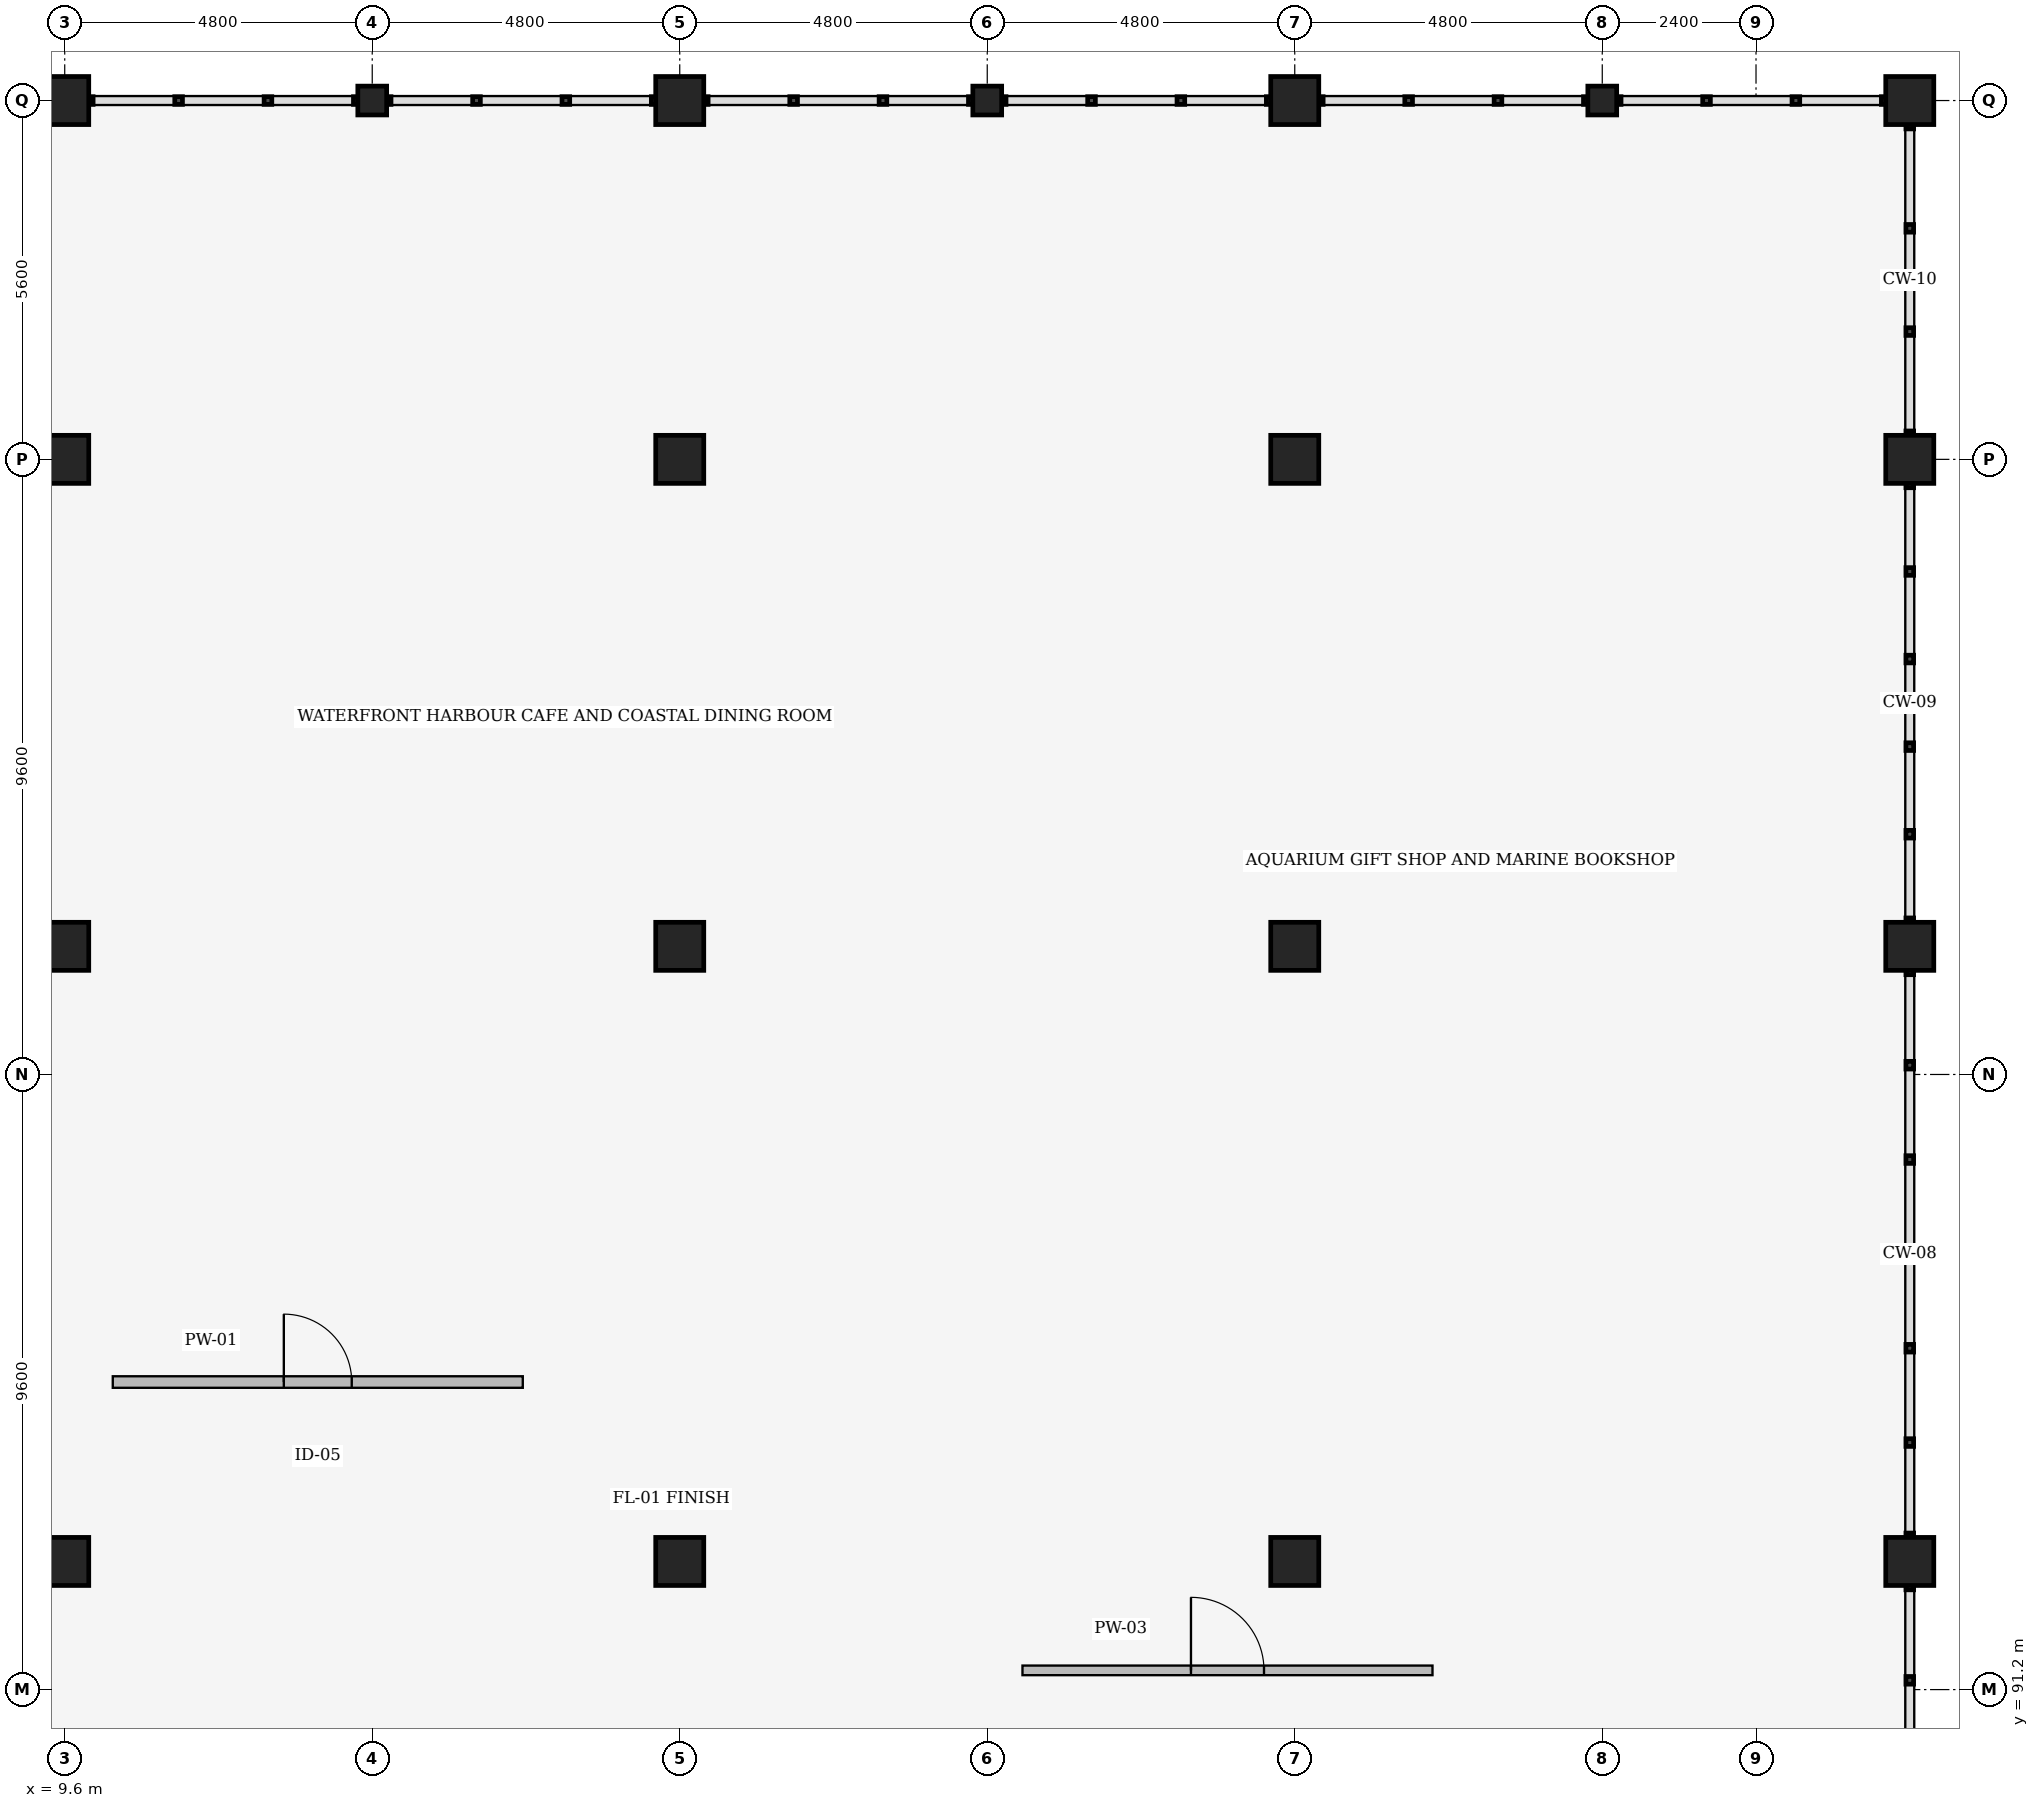
"""IFC4 building model, lengths in metres.
Left out: names, types, materials, properties, quantities, classifications, styles, units other than length and angle.
Written with IfcOpenShell. Run it as: python <this file> out.ifc"""

import sys

from ifc_helpers import new_model, si_unit, direction, frame, frame_2d, origin, origin_2d, place, context, subcontext, project, spatial, rectangle, extrude, element, fill, save


model = new_model("IFC4")
c1 = context("Model", 3, precision=1e-05, world=origin(), true_north=direction((0.0, 1.0)))
c2 = subcontext(c1, "Body", "Model", "MODEL_VIEW")
j1 = project(units=[si_unit("LENGTHUNIT", "METRE"), si_unit("PLANEANGLEUNIT", "RADIAN")], contexts=[c1])
p1 = place(None, origin())
s1 = spatial("IfcSite", under=j1, at=p1, CompositionType="ELEMENT")
p2 = place(p1, origin())
s2 = spatial("IfcBuilding", under=s1, at=p2, CompositionType="ELEMENT")
p3 = place(p2, origin())
s3 = spatial("IfcBuildingStorey", under=s2, at=p3, CompositionType="ELEMENT", Elevation=0.0)
for number, where, z_axis, x_axis in (
    (1, (9.6, 93.2, 0.0), (0.0, 0.0, 1.0), (1.0, 0.0, 0.0)),
    (2, (9.6, 102.8, 0.0), (0.0, 0.0, 1.0), (1.0, 0.0, 0.0)),
    (3, (9.6, 110.4, 0.0), (0.0, 0.0, 1.0), (1.0, 0.0, 0.0)),
    (4, (9.6, 116.0, 0.0), (0.0, 0.0, 1.0), (1.0, 0.0, 0.0)),
    (5, (19.2, 93.2, 0.0), (0.0, 0.0, 1.0), (1.0, 0.0, 0.0)),
    (6, (19.2, 102.8, 0.0), (0.0, 0.0, 1.0), (1.0, 0.0, 0.0)),
    (7, (19.2, 110.4, 0.0), (0.0, 0.0, 1.0), (1.0, 0.0, 0.0)),
    (8, (19.2, 116.0, 0.0), (0.0, 0.0, 1.0), (1.0, 0.0, 0.0)),
    (9, (28.8, 93.2, 0.0), (0.0, 0.0, 1.0), (1.0, 0.0, 0.0)),
    (10, (28.8, 102.8, 0.0), (0.0, 0.0, 1.0), (1.0, 0.0, 0.0)),
    (11, (28.8, 110.4, 0.0), (0.0, 0.0, 1.0), (1.0, 0.0, 0.0)),
    (12, (28.8, 116.0, 0.0), (0.0, 0.0, 1.0), (1.0, 0.0, 0.0)),
    (13, (38.4, 93.2, 0.0), (0.0, 0.0, 1.0), (1.0, 0.0, 0.0)),
    (14, (38.4, 102.8, 0.0), (0.0, 0.0, 1.0), (1.0, 0.0, 0.0)),
    (15, (38.4, 110.4, 0.0), (0.0, 0.0, 1.0), (1.0, 0.0, 0.0)),
    (16, (38.4, 116.0, 0.0), (0.0, 0.0, 1.0), (1.0, 0.0, 0.0)),
):
    element("IfcColumn", number, at=place(p3, frame(where, z_axis=z_axis, x_axis=x_axis)), inside=s3, PredefinedType="COLUMN", context=c2, shape_type="SweptSolid", body=[
        extrude(rectangle(XDim=0.75, YDim=0.75, at=origin_2d()), origin(), (0.0, 0.0, 1.0), 5.4),
    ])
for number, where, z_axis, x_axis in (
    (17, (14.4, 116.0, 0.0), (0.0, 0.0, 1.0), (1.0, 0.0, 0.0)),
    (18, (24.0, 116.0, 0.0), (0.0, 0.0, 1.0), (1.0, 0.0, 0.0)),
    (19, (33.6, 116.0, 0.0), (0.0, 0.0, 1.0), (1.0, 0.0, 0.0)),
):
    element("IfcColumn", number, at=place(p3, frame(where, z_axis=z_axis, x_axis=x_axis)), inside=s3, PredefinedType="PILASTER", context=c2, shape_type="SweptSolid", body=[
        extrude(rectangle(XDim=0.45, YDim=0.45, at=origin_2d()), origin(), (0.0, 0.0, 1.0), 5.1),
    ])
p4 = place(p3, frame((10.35, 96.0, 0.0), z_axis=(0.0, 0.0, 1.0), x_axis=(1.0, 0.0, 0.0)))
e20 = element("IfcWall", 20, at=p4, inside=s3, PredefinedType="PARTITIONING", context=c2, shape_type="SweptSolid", body=[
    extrude(rectangle(XDim=6.4, YDim=0.18, at=frame_2d((3.2, 0.0))), origin(), (0.0, 0.0, 1.0), 4.649),
])
p5 = place(p4, frame((2.67, 0.0, 0.0)))
e21 = element("IfcOpeningElement", 21, at=p5, cuts=e20, PredefinedType="OPENING", context=c2, shape_type="SweptSolid", body=[
    extrude(rectangle(XDim=1.06, YDim=2.2, at=frame_2d((0.53, 1.1))), frame((0.0, 0.1, 0.0), z_axis=(0.0, -1.0, 0.0), x_axis=(1.0, 0.0, 0.0)), (0.0, 0.0, 1.0), 0.2),
])
p6 = place(p3, frame((24.55, 91.5, 0.0), z_axis=(0.0, 0.0, 1.0), x_axis=(1.0, 0.0, 0.0)))
e22 = element("IfcWall", 22, at=p6, inside=s3, PredefinedType="PARTITIONING", context=c2, shape_type="SweptSolid", body=[
    extrude(rectangle(XDim=6.4, YDim=0.15, at=frame_2d((3.2, 0.0))), origin(), (0.0, 0.0, 1.0), 4.597),
])
p7 = place(p6, frame((2.63, 0.0, 0.0)))
e23 = element("IfcOpeningElement", 23, at=p7, cuts=e22, PredefinedType="OPENING", context=c2, shape_type="SweptSolid", body=[
    extrude(rectangle(XDim=1.14, YDim=2.22, at=frame_2d((0.57, 1.11))), frame((0.0, 0.085, 0.0), z_axis=(0.0, -1.0, 0.0), x_axis=(1.0, 0.0, 0.0)), (0.0, 0.0, 1.0), 0.17),
])
p8 = place(p5, origin())
e24 = element("IfcDoor", 24, at=p8, inside=s3, OperationType="SINGLE_SWING_LEFT", PredefinedType="DOOR", context=c2, shape_type="SweptSolid", body=[
    extrude(rectangle(XDim=1.06, YDim=2.2, at=frame_2d((0.53, 1.1))), frame((0.0, 0.025, 0.0), z_axis=(0.0, -1.0, 0.0), x_axis=(1.0, 0.0, 0.0)), (0.0, 0.0, 1.0), 0.05),
])
fill(e21, e24)
p9 = place(p7, origin())
e25 = element("IfcDoor", 25, at=p9, inside=s3, OperationType="SINGLE_SWING_LEFT", PredefinedType="DOOR", context=c2, shape_type="SweptSolid", body=[
    extrude(rectangle(XDim=1.14, YDim=2.22, at=frame_2d((0.57, 1.11))), frame((0.0, 0.025, 0.0), z_axis=(0.0, -1.0, 0.0), x_axis=(1.0, 0.0, 0.0)), (0.0, 0.0, 1.0), 0.05),
])
fill(e23, e25)
save(model, sys.argv[1])
